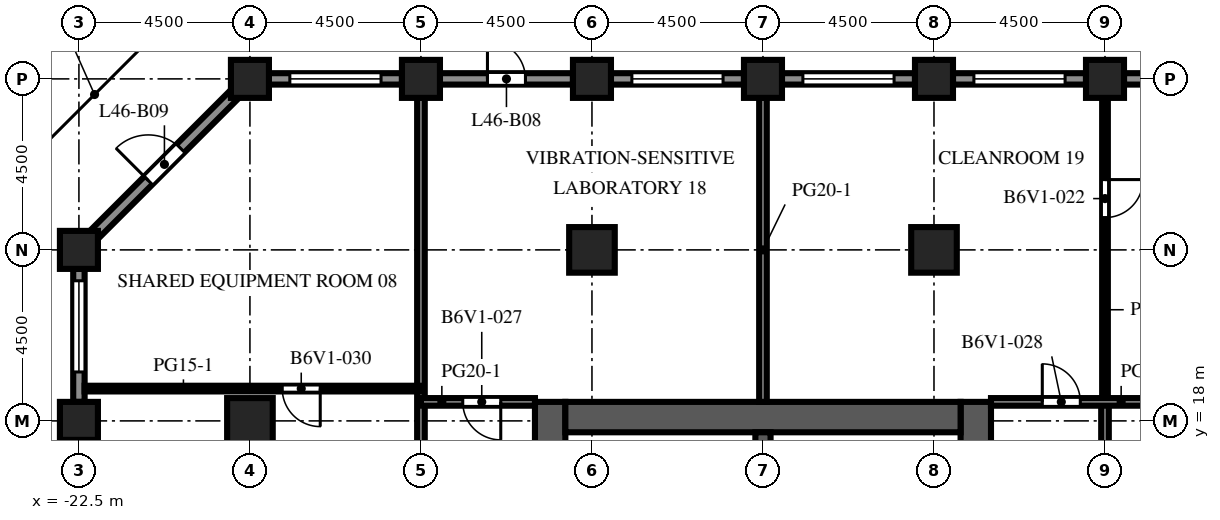
"""IFC4 building model, lengths in metres.
Left out: names, types, materials, properties, quantities, classifications, styles, units other than length and angle.
Written with IfcOpenShell. Run it as: python <this file> out.ifc"""

import sys

from ifc_helpers import new_model, si_unit, direction, frame, frame_2d, origin, origin_2d, place, context, subcontext, project, spatial, rectangle, extrude, element, fill, save


model = new_model("IFC4")
c1 = context("Model", 3, precision=1e-05, world=origin(), true_north=direction((0.0, 1.0)))
c2 = subcontext(c1, "Body", "Model", "MODEL_VIEW")
j1 = project(units=[si_unit("LENGTHUNIT", "METRE"), si_unit("PLANEANGLEUNIT", "RADIAN")], contexts=[c1])
p1 = place(None, origin())
s1 = spatial("IfcSite", under=j1, at=p1, CompositionType="ELEMENT")
p2 = place(p1, origin())
s2 = spatial("IfcBuilding", under=s1, at=p2, CompositionType="ELEMENT")
p3 = place(p2, frame((0.0, 0.0, 203.8)))
s3 = spatial("IfcBuildingStorey", under=s2, at=p3, CompositionType="ELEMENT", Elevation=203.8)
for number, where, z_axis, x_axis in (
    (1, (-22.5, 18.0, 0.0), (0.0, 0.0, 1.0), (1.0, 0.0, 0.0)),
    (2, (-22.5, 22.5, 0.0), (0.0, 0.0, 1.0), (1.0, 0.0, 0.0)),
    (3, (-18.0, 27.0, 0.0), (0.0, 0.0, 1.0), (1.0, 0.0, 0.0)),
    (4, (-13.5, 27.0, 0.0), (0.0, 0.0, 1.0), (1.0, 0.0, 0.0)),
    (5, (-9.0, 27.0, 0.0), (0.0, 0.0, 1.0), (1.0, 0.0, 0.0)),
    (6, (-4.5, 27.0, 0.0), (0.0, 0.0, 1.0), (1.0, 0.0, 0.0)),
    (7, (0.0, 27.0, 0.0), (0.0, 0.0, 1.0), (1.0, 0.0, 0.0)),
    (8, (4.5, 27.0, 0.0), (0.0, 0.0, 1.0), (1.0, 0.0, 0.0)),
):
    element("IfcColumn", number, at=place(p3, frame(where, z_axis=z_axis, x_axis=x_axis)), inside=s3, PredefinedType="COLUMN", context=c2, shape_type="SweptSolid", body=[
        extrude(rectangle(XDim=1.0, YDim=1.0, at=origin_2d()), origin(), (0.0, 0.0, 1.0), 4.1),
    ])
for number, where, z_axis, x_axis in (
    (9, (-18.0, 18.0, 0.0), (0.0, 0.0, 1.0), (1.0, 0.0, 0.0)),
    (10, (-9.0, 22.5, 0.0), (0.0, 0.0, 1.0), (1.0, 0.0, 0.0)),
    (11, (0.0, 22.5, 0.0), (0.0, 0.0, 1.0), (1.0, 0.0, 0.0)),
):
    element("IfcColumn", number, at=place(p3, frame(where, z_axis=z_axis, x_axis=x_axis)), inside=s3, PredefinedType="COLUMN", context=c2, shape_type="SweptSolid", body=[
        extrude(rectangle(XDim=1.2, YDim=1.2, at=origin_2d()), origin(), (0.0, 0.0, 1.0), 4.1),
    ])
p4 = place(p3, frame((-10.1, -9.0, 0.0), z_axis=(0.0, 0.0, 1.0), x_axis=(0.0, 1.0, 0.0)))
e12 = element("IfcWall", 12, at=p4, inside=s3, PredefinedType="SHEAR", context=c2, shape_type="SweptSolid", body=[
    extrude(rectangle(XDim=27.5, YDim=0.8, at=frame_2d((13.75, 0.0))), origin(), (0.0, 0.0, 1.0), 4.1),
])
p5 = place(p4, frame((12.55, 0.0, 0.0)))
e13 = element("IfcOpeningElement", 13, at=p5, cuts=e12, PredefinedType="OPENING", context=c2, shape_type="SweptSolid", body=[
    extrude(rectangle(XDim=2.4, YDim=2.4, at=frame_2d((1.2, 1.2))), frame((0.0, 0.41, 0.0), z_axis=(0.0, -1.0, 0.0), x_axis=(1.0, 0.0, 0.0)), (0.0, 0.0, 1.0), 0.82),
])
p6 = place(p4, frame((6.825, 0.0, 0.0)))
e14 = element("IfcOpeningElement", 14, at=p6, cuts=e12, PredefinedType="OPENING", context=c2, shape_type="SweptSolid", body=[
    extrude(rectangle(XDim=1.2, YDim=2.1, at=frame_2d((0.6, 1.05))), frame((0.0, 0.41, 0.0), z_axis=(0.0, -1.0, 0.0), x_axis=(1.0, 0.0, 0.0)), (0.0, 0.0, 1.0), 0.82),
])
p7 = place(p4, frame((19.475, 0.0, 0.0)))
e15 = element("IfcOpeningElement", 15, at=p7, cuts=e12, PredefinedType="OPENING", context=c2, shape_type="SweptSolid", body=[
    extrude(rectangle(XDim=1.2, YDim=2.1, at=frame_2d((0.6, 1.05))), frame((0.0, 0.41, 0.0), z_axis=(0.0, -1.0, 0.0), x_axis=(1.0, 0.0, 0.0)), (0.0, 0.0, 1.0), 0.82),
])
p8 = place(p3, frame((1.1, -9.0, 0.0), z_axis=(0.0, 0.0, 1.0), x_axis=(0.0, 1.0, 0.0)))
e16 = element("IfcWall", 16, at=p8, inside=s3, PredefinedType="SHEAR", context=c2, shape_type="SweptSolid", body=[
    extrude(rectangle(XDim=27.5, YDim=0.8, at=frame_2d((13.75, 0.0))), origin(), (0.0, 0.0, 1.0), 4.1),
])
p9 = place(p8, frame((12.55, 0.0, 0.0)))
e17 = element("IfcOpeningElement", 17, at=p9, cuts=e16, PredefinedType="OPENING", context=c2, shape_type="SweptSolid", body=[
    extrude(rectangle(XDim=2.4, YDim=2.4, at=frame_2d((1.2, 1.2))), frame((0.0, 0.41, 0.0), z_axis=(0.0, -1.0, 0.0), x_axis=(1.0, 0.0, 0.0)), (0.0, 0.0, 1.0), 0.82),
])
p10 = place(p8, frame((3.95, 0.0, 0.0)))
e18 = element("IfcOpeningElement", 18, at=p10, cuts=e16, PredefinedType="OPENING", context=c2, shape_type="SweptSolid", body=[
    extrude(rectangle(XDim=1.2, YDim=2.1, at=frame_2d((0.6, 1.05))), frame((0.0, 0.41, 0.0), z_axis=(0.0, -1.0, 0.0), x_axis=(1.0, 0.0, 0.0)), (0.0, 0.0, 1.0), 0.82),
])
p11 = place(p8, frame((22.35, 0.0, 0.0)))
e19 = element("IfcOpeningElement", 19, at=p11, cuts=e16, PredefinedType="OPENING", context=c2, shape_type="SweptSolid", body=[
    extrude(rectangle(XDim=1.2, YDim=2.1, at=frame_2d((0.6, 1.05))), frame((0.0, 0.41, 0.0), z_axis=(0.0, -1.0, 0.0), x_axis=(1.0, 0.0, 0.0)), (0.0, 0.0, 1.0), 0.82),
])
p12 = place(p3, frame((-9.7, 18.1, 0.0), z_axis=(0.0, 0.0, 1.0), x_axis=(1.0, 0.0, 0.0)))
e20 = element("IfcWall", 20, at=p12, inside=s3, PredefinedType="SHEAR", context=c2, shape_type="SweptSolid", body=[
    extrude(rectangle(XDim=10.4, YDim=0.8, at=frame_2d((5.2, 0.0))), origin(), (0.0, 0.0, 1.0), 4.1),
])
p13 = place(p3, frame((-4.5, 10.2, 0.0), z_axis=(0.0, 0.0, 1.0), x_axis=(0.0, 1.0, 0.0)))
e21 = element("IfcWall", 21, at=p13, inside=s3, PredefinedType="SHEAR", context=c2, shape_type="SweptSolid", body=[
    extrude(rectangle(XDim=7.5, YDim=0.4, at=frame_2d((3.75, 0.0))), origin(), (0.0, 0.0, 1.0), 4.1),
])
p14 = place(p3, frame((5.0, 27.0, 0.0), z_axis=(0.0, 0.0, 1.0), x_axis=(1.0, 0.0, 0.0)))
e22 = element("IfcWall", 22, at=p14, inside=s3, PredefinedType="SOLIDWALL", context=c2, shape_type="SweptSolid", body=[
    extrude(rectangle(XDim=3.5, YDim=0.3, at=frame_2d((1.75, 0.0))), origin(), (0.0, 0.0, 1.0), 2.85),
])
p15 = place(p14, frame((0.55, 0.0, 0.8)))
e23 = element("IfcOpeningElement", 23, at=p15, cuts=e22, PredefinedType="OPENING", context=c2, shape_type="SweptSolid", body=[
    extrude(rectangle(XDim=2.4, YDim=1.7, at=frame_2d((1.2, 0.85))), frame((0.0, 0.16, 0.0), z_axis=(0.0, -1.0, 0.0), x_axis=(1.0, 0.0, 0.0)), (0.0, 0.0, 1.0), 0.32),
])
p16 = place(p3, frame((0.5, 27.0, 0.0), z_axis=(0.0, 0.0, 1.0), x_axis=(1.0, 0.0, 0.0)))
e24 = element("IfcWall", 24, at=p16, inside=s3, PredefinedType="SOLIDWALL", context=c2, shape_type="SweptSolid", body=[
    extrude(rectangle(XDim=3.5, YDim=0.3, at=frame_2d((1.75, 0.0))), origin(), (0.0, 0.0, 1.0), 2.85),
])
p17 = place(p16, frame((0.55, 0.0, 0.8)))
e25 = element("IfcOpeningElement", 25, at=p17, cuts=e24, PredefinedType="OPENING", context=c2, shape_type="SweptSolid", body=[
    extrude(rectangle(XDim=2.4, YDim=1.7, at=frame_2d((1.2, 0.85))), frame((0.0, 0.16, 0.0), z_axis=(0.0, -1.0, 0.0), x_axis=(1.0, 0.0, 0.0)), (0.0, 0.0, 1.0), 0.32),
])
p18 = place(p3, frame((-4.0, 27.0, 0.0), z_axis=(0.0, 0.0, 1.0), x_axis=(1.0, 0.0, 0.0)))
e26 = element("IfcWall", 26, at=p18, inside=s3, PredefinedType="SOLIDWALL", context=c2, shape_type="SweptSolid", body=[
    extrude(rectangle(XDim=3.5, YDim=0.3, at=frame_2d((1.75, 0.0))), origin(), (0.0, 0.0, 1.0), 2.85),
])
p19 = place(p18, frame((0.55, 0.0, 0.8)))
e27 = element("IfcOpeningElement", 27, at=p19, cuts=e26, PredefinedType="OPENING", context=c2, shape_type="SweptSolid", body=[
    extrude(rectangle(XDim=2.4, YDim=1.7, at=frame_2d((1.2, 0.85))), frame((0.0, 0.16, 0.0), z_axis=(0.0, -1.0, 0.0), x_axis=(1.0, 0.0, 0.0)), (0.0, 0.0, 1.0), 0.32),
])
p20 = place(p3, frame((-8.5, 27.0, 0.0), z_axis=(0.0, 0.0, 1.0), x_axis=(1.0, 0.0, 0.0)))
e28 = element("IfcWall", 28, at=p20, inside=s3, PredefinedType="SOLIDWALL", context=c2, shape_type="SweptSolid", body=[
    extrude(rectangle(XDim=3.5, YDim=0.3, at=frame_2d((1.75, 0.0))), origin(), (0.0, 0.0, 1.0), 2.85),
])
p21 = place(p20, frame((0.55, 0.0, 0.8)))
e29 = element("IfcOpeningElement", 29, at=p21, cuts=e28, PredefinedType="OPENING", context=c2, shape_type="SweptSolid", body=[
    extrude(rectangle(XDim=2.4, YDim=1.7, at=frame_2d((1.2, 0.85))), frame((0.0, 0.16, 0.0), z_axis=(0.0, -1.0, 0.0), x_axis=(1.0, 0.0, 0.0)), (0.0, 0.0, 1.0), 0.32),
])
p22 = place(p3, frame((-13.0, 27.0, 0.0), z_axis=(0.0, 0.0, 1.0), x_axis=(1.0, 0.0, 0.0)))
e30 = element("IfcWall", 30, at=p22, inside=s3, PredefinedType="SOLIDWALL", context=c2, shape_type="SweptSolid", body=[
    extrude(rectangle(XDim=3.5, YDim=0.3, at=frame_2d((1.75, 0.0))), origin(), (0.0, 0.0, 1.0), 2.85),
])
p23 = place(p22, frame((1.25, 0.0, 0.0)))
e31 = element("IfcOpeningElement", 31, at=p23, cuts=e30, PredefinedType="OPENING", context=c2, shape_type="SweptSolid", body=[
    extrude(rectangle(XDim=1.0, YDim=2.2, at=frame_2d((0.5, 1.1))), frame((0.0, 0.16, 0.0), z_axis=(0.0, -1.0, 0.0), x_axis=(1.0, 0.0, 0.0)), (0.0, 0.0, 1.0), 0.32),
])
p24 = place(p3, frame((-17.5, 27.0, 0.0), z_axis=(0.0, 0.0, 1.0), x_axis=(1.0, 0.0, 0.0)))
e32 = element("IfcWall", 32, at=p24, inside=s3, PredefinedType="SOLIDWALL", context=c2, shape_type="SweptSolid", body=[
    extrude(rectangle(XDim=3.5, YDim=0.3, at=frame_2d((1.75, 0.0))), origin(), (0.0, 0.0, 1.0), 2.85),
])
p25 = place(p24, frame((0.55, 0.0, 0.8)))
e33 = element("IfcOpeningElement", 33, at=p25, cuts=e32, PredefinedType="OPENING", context=c2, shape_type="SweptSolid", body=[
    extrude(rectangle(XDim=2.4, YDim=1.7, at=frame_2d((1.2, 0.85))), frame((0.0, 0.16, 0.0), z_axis=(0.0, -1.0, 0.0), x_axis=(1.0, 0.0, 0.0)), (0.0, 0.0, 1.0), 0.32),
])
p26 = place(p3, frame((-22.106, 22.894, 0.0), z_axis=(0.0, 0.0, 1.0), x_axis=(0.707106781187, 0.707106781187, 0.0)))
e34 = element("IfcWall", 34, at=p26, inside=s3, PredefinedType="SOLIDWALL", context=c2, shape_type="SweptSolid", body=[
    extrude(rectangle(XDim=5.25, YDim=0.3, at=frame_2d((2.625, 0.0))), origin(), (0.0, 0.0, 1.0), 2.85),
])
p27 = place(p26, frame((2.025, 0.0, 0.0)))
e35 = element("IfcOpeningElement", 35, at=p27, cuts=e34, PredefinedType="OPENING", context=c2, shape_type="SweptSolid", body=[
    extrude(rectangle(XDim=1.2, YDim=2.2, at=frame_2d((0.6, 1.1))), frame((0.0, 0.16, 0.0), z_axis=(0.0, -1.0, 0.0), x_axis=(1.0, 0.0, 0.0)), (0.0, 0.0, 1.0), 0.32),
])
p28 = place(p3, frame((-22.5, 18.5, 0.0), z_axis=(0.0, 0.0, 1.0), x_axis=(0.0, 1.0, 0.0)))
e36 = element("IfcWall", 36, at=p28, inside=s3, PredefinedType="SOLIDWALL", context=c2, shape_type="SweptSolid", body=[
    extrude(rectangle(XDim=3.5, YDim=0.3, at=frame_2d((1.75, 0.0))), origin(), (0.0, 0.0, 1.0), 2.85),
])
p29 = place(p28, frame((0.788, 0.0, 0.8)))
e37 = element("IfcOpeningElement", 37, at=p29, cuts=e36, PredefinedType="OPENING", context=c2, shape_type="SweptSolid", body=[
    extrude(rectangle(XDim=2.4, YDim=1.7, at=frame_2d((1.2, 0.85))), frame((0.0, 0.16, 0.0), z_axis=(0.0, -1.0, 0.0), x_axis=(1.0, 0.0, 0.0)), (0.0, 0.0, 1.0), 0.32),
])
p30 = place(p3, frame((-0.7, 14.85, 0.0), z_axis=(0.0, 0.0, 1.0), x_axis=(0.0, 1.0, 0.0)))
e38 = element("IfcWall", 38, at=p30, inside=s3, PredefinedType="PARTITIONING", context=c2, shape_type="SweptSolid", body=[
    extrude(rectangle(XDim=2.85, YDim=0.1, at=frame_2d((1.425, 0.0))), origin(), (0.0, 0.0, 1.0), 3.65),
])
p31 = place(p30, frame((0.925, 0.0, 0.0)))
e39 = element("IfcOpeningElement", 39, at=p31, cuts=e38, PredefinedType="OPENING", context=c2, shape_type="SweptSolid", body=[
    extrude(rectangle(XDim=1.0, YDim=2.1, at=frame_2d((0.5, 1.05))), frame((0.0, 0.06, 0.0), z_axis=(0.0, -1.0, 0.0), x_axis=(1.0, 0.0, 0.0)), (0.0, 0.0, 1.0), 0.12),
])
p32 = place(p3, frame((-13.5, 6.25, 0.0), z_axis=(0.0, 0.0, 1.0), x_axis=(0.0, 1.0, 0.0)))
e40 = element("IfcWall", 40, at=p32, inside=s3, PredefinedType="PARTITIONING", context=c2, shape_type="SweptSolid", body=[
    extrude(rectangle(XDim=20.25, YDim=0.2, at=frame_2d((10.125, 0.0))), origin(), (0.0, 0.0, 1.0), 3.65),
])
p33 = place(p3, frame((-4.5, 18.5, 0.0), z_axis=(0.0, 0.0, 1.0), x_axis=(0.0, 1.0, 0.0)))
e41 = element("IfcWall", 41, at=p33, inside=s3, PredefinedType="PARTITIONING", context=c2, shape_type="SweptSolid", body=[
    extrude(rectangle(XDim=8.0, YDim=0.2, at=frame_2d((4.0, 0.0))), origin(), (0.0, 0.0, 1.0), 3.65),
])
p34 = place(p3, frame((4.5, 26.5, 0.0), z_axis=(0.0, 0.0, 1.0), x_axis=(0.0, -1.0, 0.0)))
e42 = element("IfcWall", 42, at=p34, inside=s3, PredefinedType="PARTITIONING", context=c2, shape_type="SweptSolid", body=[
    extrude(rectangle(XDim=8.0, YDim=0.15, at=frame_2d((4.0, 0.0))), origin(), (0.0, 0.0, 1.0), 3.65),
])
p35 = place(p34, frame((2.15, 0.0, 0.0)))
e43 = element("IfcOpeningElement", 43, at=p35, cuts=e42, PredefinedType="OPENING", context=c2, shape_type="SweptSolid", body=[
    extrude(rectangle(XDim=1.0, YDim=2.1, at=frame_2d((0.5, 1.05))), frame((0.0, 0.085, 0.0), z_axis=(0.0, -1.0, 0.0), x_axis=(1.0, 0.0, 0.0)), (0.0, 0.0, 1.0), 0.17),
])
p36 = place(p3, frame((4.5, 18.5, 0.0), z_axis=(0.0, 0.0, 1.0), x_axis=(0.0, -1.0, 0.0)))
e44 = element("IfcWall", 44, at=p36, inside=s3, PredefinedType="PARTITIONING", context=c2, shape_type="SweptSolid", body=[
    extrude(rectangle(XDim=11.8, YDim=0.2, at=frame_2d((5.9, 0.0))), origin(), (0.0, 0.0, 1.0), 3.65),
])
p37 = place(p36, frame((6.45, 0.0, 0.0)))
e45 = element("IfcOpeningElement", 45, at=p37, cuts=e44, PredefinedType="OPENING", context=c2, shape_type="SweptSolid", body=[
    extrude(rectangle(XDim=1.0, YDim=2.1, at=frame_2d((0.5, 1.05))), frame((0.0, 0.11, 0.0), z_axis=(0.0, -1.0, 0.0), x_axis=(1.0, 0.0, 0.0)), (0.0, 0.0, 1.0), 0.22),
])
p38 = place(p3, frame((-13.5, 18.5, 0.0), z_axis=(0.0, 0.0, 1.0), x_axis=(1.0, 0.0, 0.0)))
e46 = element("IfcWall", 46, at=p38, inside=s3, PredefinedType="PARTITIONING", context=c2, shape_type="SweptSolid", body=[
    extrude(rectangle(XDim=3.0, YDim=0.2, at=frame_2d((1.5, 0.0))), origin(), (0.0, 0.0, 1.0), 3.65),
])
p39 = place(p38, frame((1.1, 0.0, 0.0)))
e47 = element("IfcOpeningElement", 47, at=p39, cuts=e46, PredefinedType="OPENING", context=c2, shape_type="SweptSolid", body=[
    extrude(rectangle(XDim=1.0, YDim=2.1, at=frame_2d((0.5, 1.05))), frame((0.0, 0.11, 0.0), z_axis=(0.0, -1.0, 0.0), x_axis=(1.0, 0.0, 0.0)), (0.0, 0.0, 1.0), 0.22),
])
p40 = place(p3, frame((1.5, 18.5, 0.0), z_axis=(0.0, 0.0, 1.0), x_axis=(1.0, 0.0, 0.0)))
e48 = element("IfcWall", 48, at=p40, inside=s3, PredefinedType="PARTITIONING", context=c2, shape_type="SweptSolid", body=[
    extrude(rectangle(XDim=4.5, YDim=0.2, at=frame_2d((2.25, 0.0))), origin(), (0.0, 0.0, 1.0), 3.65),
])
p41 = place(p40, frame((1.35, 0.0, 0.0)))
e49 = element("IfcOpeningElement", 49, at=p41, cuts=e48, PredefinedType="OPENING", context=c2, shape_type="SweptSolid", body=[
    extrude(rectangle(XDim=1.0, YDim=2.1, at=frame_2d((0.5, 1.05))), frame((0.0, 0.11, 0.0), z_axis=(0.0, -1.0, 0.0), x_axis=(1.0, 0.0, 0.0)), (0.0, 0.0, 1.0), 0.22),
])
p42 = place(p3, frame((-22.35, 18.85, 0.0), z_axis=(0.0, 0.0, 1.0), x_axis=(1.0, 0.0, 0.0)))
e50 = element("IfcWall", 50, at=p42, inside=s3, PredefinedType="PARTITIONING", context=c2, shape_type="SweptSolid", body=[
    extrude(rectangle(XDim=8.85, YDim=0.15, at=frame_2d((4.425, 0.0))), origin(), (0.0, 0.0, 1.0), 3.65),
])
p43 = place(p42, frame((5.2, 0.0, 0.0)))
e51 = element("IfcOpeningElement", 51, at=p43, cuts=e50, PredefinedType="OPENING", context=c2, shape_type="SweptSolid", body=[
    extrude(rectangle(XDim=1.0, YDim=2.1, at=frame_2d((0.5, 1.05))), frame((0.0, 0.085, 0.0), z_axis=(0.0, -1.0, 0.0), x_axis=(1.0, 0.0, 0.0)), (0.0, 0.0, 1.0), 0.17),
])
p44 = place(p17, origin())
e52 = element("IfcWindow", 52, at=p44, inside=s3, PartitioningType="SINGLE_PANEL", PredefinedType="WINDOW", context=c2, shape_type="SweptSolid", body=[
    extrude(rectangle(XDim=2.4, YDim=1.7, at=frame_2d((1.2, 0.85))), frame((0.0, 0.03, 0.0), z_axis=(0.0, -1.0, 0.0), x_axis=(1.0, 0.0, 0.0)), (0.0, 0.0, 1.0), 0.06),
])
fill(e25, e52)
p45 = place(p19, origin())
e53 = element("IfcWindow", 53, at=p45, inside=s3, PartitioningType="SINGLE_PANEL", PredefinedType="WINDOW", context=c2, shape_type="SweptSolid", body=[
    extrude(rectangle(XDim=2.4, YDim=1.7, at=frame_2d((1.2, 0.85))), frame((0.0, 0.03, 0.0), z_axis=(0.0, -1.0, 0.0), x_axis=(1.0, 0.0, 0.0)), (0.0, 0.0, 1.0), 0.06),
])
fill(e27, e53)
p46 = place(p21, origin())
e54 = element("IfcWindow", 54, at=p46, inside=s3, PartitioningType="SINGLE_PANEL", PredefinedType="WINDOW", context=c2, shape_type="SweptSolid", body=[
    extrude(rectangle(XDim=2.4, YDim=1.7, at=frame_2d((1.2, 0.85))), frame((0.0, 0.03, 0.0), z_axis=(0.0, -1.0, 0.0), x_axis=(1.0, 0.0, 0.0)), (0.0, 0.0, 1.0), 0.06),
])
fill(e29, e54)
p47 = place(p23, origin())
e55 = element("IfcDoor", 55, at=p47, inside=s3, OperationType="SINGLE_SWING_LEFT", PredefinedType="DOOR", context=c2, shape_type="SweptSolid", body=[
    extrude(rectangle(XDim=1.0, YDim=2.2, at=frame_2d((0.5, 1.1))), frame((0.0, 0.025, 0.0), z_axis=(0.0, -1.0, 0.0), x_axis=(1.0, 0.0, 0.0)), (0.0, 0.0, 1.0), 0.05),
])
fill(e31, e55)
p48 = place(p25, origin())
e56 = element("IfcWindow", 56, at=p48, inside=s3, PartitioningType="SINGLE_PANEL", PredefinedType="WINDOW", context=c2, shape_type="SweptSolid", body=[
    extrude(rectangle(XDim=2.4, YDim=1.7, at=frame_2d((1.2, 0.85))), frame((0.0, 0.03, 0.0), z_axis=(0.0, -1.0, 0.0), x_axis=(1.0, 0.0, 0.0)), (0.0, 0.0, 1.0), 0.06),
])
fill(e33, e56)
p49 = place(p27, origin())
e57 = element("IfcDoor", 57, at=p49, inside=s3, OperationType="SINGLE_SWING_LEFT", PredefinedType="DOOR", context=c2, shape_type="SweptSolid", body=[
    extrude(rectangle(XDim=1.2, YDim=2.2, at=frame_2d((0.6, 1.1))), frame((0.0, 0.025, 0.0), z_axis=(0.0, -1.0, 0.0), x_axis=(1.0, 0.0, 0.0)), (0.0, 0.0, 1.0), 0.05),
])
fill(e35, e57)
p50 = place(p29, origin())
e58 = element("IfcWindow", 58, at=p50, inside=s3, PartitioningType="SINGLE_PANEL", PredefinedType="WINDOW", context=c2, shape_type="SweptSolid", body=[
    extrude(rectangle(XDim=2.4, YDim=1.7, at=frame_2d((1.2, 0.85))), frame((0.0, 0.03, 0.0), z_axis=(0.0, -1.0, 0.0), x_axis=(1.0, 0.0, 0.0)), (0.0, 0.0, 1.0), 0.06),
])
fill(e37, e58)
p51 = place(p35, origin())
e59 = element("IfcDoor", 59, at=p51, inside=s3, OperationType="SINGLE_SWING_LEFT", PredefinedType="DOOR", context=c2, shape_type="SweptSolid", body=[
    extrude(rectangle(XDim=1.0, YDim=2.1, at=frame_2d((0.5, 1.05))), frame((0.0, 0.025, 0.0), z_axis=(0.0, -1.0, 0.0), x_axis=(1.0, 0.0, 0.0)), (0.0, 0.0, 1.0), 0.05),
])
fill(e43, e59)
p52 = place(p39, origin())
e60 = element("IfcDoor", 60, at=p52, inside=s3, OperationType="SINGLE_SWING_RIGHT", PredefinedType="DOOR", context=c2, shape_type="SweptSolid", body=[
    extrude(rectangle(XDim=1.0, YDim=2.1, at=frame_2d((0.5, 1.05))), frame((0.0, 0.025, 0.0), z_axis=(0.0, -1.0, 0.0), x_axis=(1.0, 0.0, 0.0)), (0.0, 0.0, 1.0), 0.05),
])
fill(e47, e60)
p53 = place(p41, origin())
e61 = element("IfcDoor", 61, at=p53, inside=s3, OperationType="SINGLE_SWING_LEFT", PredefinedType="DOOR", context=c2, shape_type="SweptSolid", body=[
    extrude(rectangle(XDim=1.0, YDim=2.1, at=frame_2d((0.5, 1.05))), frame((0.0, 0.025, 0.0), z_axis=(0.0, -1.0, 0.0), x_axis=(1.0, 0.0, 0.0)), (0.0, 0.0, 1.0), 0.05),
])
fill(e49, e61)
p54 = place(p43, origin())
e62 = element("IfcDoor", 62, at=p54, inside=s3, OperationType="SINGLE_SWING_RIGHT", PredefinedType="DOOR", context=c2, shape_type="SweptSolid", body=[
    extrude(rectangle(XDim=1.0, YDim=2.1, at=frame_2d((0.5, 1.05))), frame((0.0, 0.025, 0.0), z_axis=(0.0, -1.0, 0.0), x_axis=(1.0, 0.0, 0.0)), (0.0, 0.0, 1.0), 0.05),
])
fill(e51, e62)
save(model, sys.argv[1])
